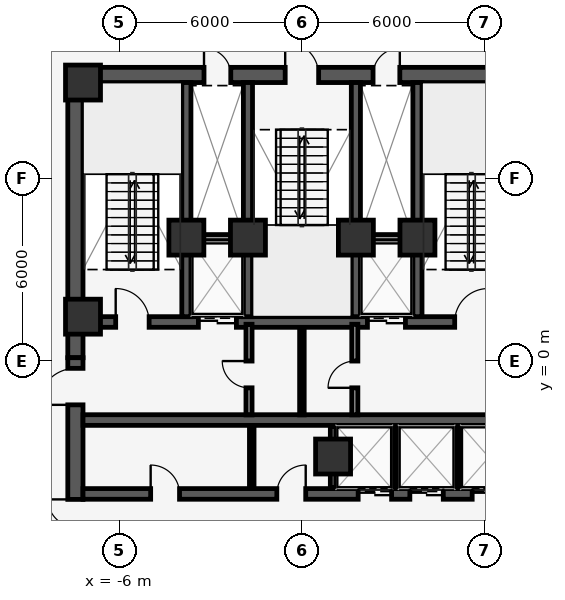
"""IFC4 building model, lengths in metres.
Left out: names, types, materials, properties, quantities, classifications, styles, units other than length and angle.
Written with IfcOpenShell. Run it as: python <this file> out.ifc"""

import sys

from ifc_helpers import new_model, si_unit, direction, frame, frame_2d, origin, origin_2d, place, context, subcontext, project, spatial, rectangle, extrude, element, fill, save


model = new_model("IFC4")
c1 = context("Model", 3, precision=1e-05, world=origin(), true_north=direction((0.0, 1.0)))
c2 = subcontext(c1, "Body", "Model", "MODEL_VIEW")
j1 = project(units=[si_unit("LENGTHUNIT", "METRE"), si_unit("PLANEANGLEUNIT", "RADIAN")], contexts=[c1])
p1 = place(None, origin())
s1 = spatial("IfcSite", under=j1, at=p1, CompositionType="ELEMENT")
p2 = place(p1, origin())
s2 = spatial("IfcBuilding", under=s1, at=p2, CompositionType="ELEMENT")
p3 = place(p2, frame((0.0, 0.0, 236.3)))
s3 = spatial("IfcBuildingStorey", under=s2, at=p3, CompositionType="ELEMENT", Elevation=236.3)
p4 = place(p3, frame((-7.45, 9.4, 0.0), z_axis=(0.0, 0.0, 1.0), x_axis=(1.0, 0.0, 0.0)))
e1 = element("IfcWall", 1, at=p4, inside=s3, PredefinedType="SHEAR", context=c2, shape_type="SweptSolid", body=[
    extrude(rectangle(XDim=14.9, YDim=0.5, at=frame_2d((7.45, 0.0))), origin(), (0.0, 0.0, 1.0), 3.85),
])
p5 = place(p4, frame((6.9, 0.0, 0.0)))
e2 = element("IfcOpeningElement", 2, at=p5, cuts=e1, PredefinedType="OPENING", context=c2, shape_type="SweptSolid", body=[
    extrude(rectangle(XDim=1.1, YDim=2.15, at=frame_2d((0.55, 1.075))), frame((0.0, 0.26, 0.0), z_axis=(0.0, -1.0, 0.0), x_axis=(1.0, 0.0, 0.0)), (0.0, 0.0, 1.0), 0.52),
])
p6 = place(p4, frame((4.23, 0.0, 0.0)))
e3 = element("IfcOpeningElement", 3, at=p6, cuts=e1, PredefinedType="OPENING", context=c2, shape_type="SweptSolid", body=[
    extrude(rectangle(XDim=0.88, YDim=2.15, at=frame_2d((0.44, 1.075))), frame((0.0, 0.26, 0.0), z_axis=(0.0, -1.0, 0.0), x_axis=(1.0, 0.0, 0.0)), (0.0, 0.0, 1.0), 0.52),
])
p7 = place(p4, frame((9.79, 0.0, 0.0)))
e4 = element("IfcOpeningElement", 4, at=p7, cuts=e1, PredefinedType="OPENING", context=c2, shape_type="SweptSolid", body=[
    extrude(rectangle(XDim=0.88, YDim=2.15, at=frame_2d((0.44, 1.075))), frame((0.0, 0.26, 0.0), z_axis=(0.0, -1.0, 0.0), x_axis=(1.0, 0.0, 0.0)), (0.0, 0.0, 1.0), 0.52),
])
p8 = place(p3, frame((-7.2, 1.275, 0.0), z_axis=(0.0, 0.0, 1.0), x_axis=(1.0, 0.0, 0.0)))
e5 = element("IfcWall", 5, at=p8, inside=s3, PredefinedType="SHEAR", context=c2, shape_type="SweptSolid", body=[
    extrude(rectangle(XDim=14.4, YDim=0.35, at=frame_2d((7.2, 0.0))), origin(), (0.0, 0.0, 1.0), 3.85),
])
p9 = place(p8, frame((3.795, 0.0, 0.0)))
e6 = element("IfcOpeningElement", 6, at=p9, cuts=e5, PredefinedType="OPENING", context=c2, shape_type="SweptSolid", body=[
    extrude(rectangle(XDim=1.25, YDim=2.25, at=frame_2d((0.625, 1.125))), frame((0.0, 0.185, 0.0), z_axis=(0.0, -1.0, 0.0), x_axis=(1.0, 0.0, 0.0)), (0.0, 0.0, 1.0), 0.37),
])
p10 = place(p8, frame((9.355, 0.0, 0.0)))
e7 = element("IfcOpeningElement", 7, at=p10, cuts=e5, PredefinedType="OPENING", context=c2, shape_type="SweptSolid", body=[
    extrude(rectangle(XDim=1.25, YDim=2.25, at=frame_2d((0.625, 1.125))), frame((0.0, 0.185, 0.0), z_axis=(0.0, -1.0, 0.0), x_axis=(1.0, 0.0, 0.0)), (0.0, 0.0, 1.0), 0.37),
])
p11 = place(p8, frame((1.075, 0.0, 0.0)))
e8 = element("IfcOpeningElement", 8, at=p11, cuts=e5, PredefinedType="OPENING", context=c2, shape_type="SweptSolid", body=[
    extrude(rectangle(XDim=1.1, YDim=2.15, at=frame_2d((0.55, 1.075))), frame((0.0, 0.185, 0.0), z_axis=(0.0, -1.0, 0.0), x_axis=(1.0, 0.0, 0.0)), (0.0, 0.0, 1.0), 0.37),
])
p12 = place(p8, frame((12.225, 0.0, 0.0)))
e9 = element("IfcOpeningElement", 9, at=p12, cuts=e5, PredefinedType="OPENING", context=c2, shape_type="SweptSolid", body=[
    extrude(rectangle(XDim=1.1, YDim=2.15, at=frame_2d((0.55, 1.075))), frame((0.0, 0.185, 0.0), z_axis=(0.0, -1.0, 0.0), x_axis=(1.0, 0.0, 0.0)), (0.0, 0.0, 1.0), 0.37),
])
for number, where, z_axis, x_axis in (
    (10, (-3.8, 1.45, 0.0), (0.0, 0.0, 1.0), (0.0, 1.0, 0.0)),
    (11, (-1.775, 1.45, 0.0), (0.0, 0.0, 1.0), (0.0, 1.0, 0.0)),
    (12, (1.775, 1.45, 0.0), (0.0, 0.0, 1.0), (0.0, 1.0, 0.0)),
    (13, (3.8, 1.45, 0.0), (0.0, 0.0, 1.0), (0.0, 1.0, 0.0)),
):
    element("IfcWall", number, at=place(p3, frame(where, z_axis=z_axis, x_axis=x_axis)), inside=s3, PredefinedType="SHEAR", context=c2, shape_type="SweptSolid", body=[
        extrude(rectangle(XDim=7.7, YDim=0.3, at=frame_2d((3.85, 0.0))), origin(), (0.0, 0.0, 1.0), 3.85),
    ])
p13 = place(p3, frame((-7.45, 0.1, 0.0), z_axis=(0.0, 0.0, 1.0), x_axis=(0.0, 1.0, 0.0)))
e14 = element("IfcWall", 14, at=p13, inside=s3, PredefinedType="SHEAR", context=c2, shape_type="SweptSolid", body=[
    extrude(rectangle(XDim=9.05, YDim=0.5, at=frame_2d((4.525, 0.0))), origin(), (0.0, 0.0, 1.0), 3.85),
])
p14 = place(p3, frame((-7.45, -9.0, 0.0), z_axis=(0.0, 0.0, 1.0), x_axis=(0.0, 1.0, 0.0)))
e15 = element("IfcWall", 15, at=p14, inside=s3, PredefinedType="SHEAR", context=c2, shape_type="SweptSolid", body=[
    extrude(rectangle(XDim=9.1, YDim=0.5, at=frame_2d((4.55, 0.0))), origin(), (0.0, 0.0, 1.0), 3.85),
])
p15 = place(p14, frame((2.64, 0.0, 0.0)))
e16 = element("IfcOpeningElement", 16, at=p15, cuts=e15, PredefinedType="OPENING", context=c2, shape_type="SweptSolid", body=[
    extrude(rectangle(XDim=1.8, YDim=2.2, at=frame_2d((0.9, 1.1))), frame((0.0, 0.26, 0.0), z_axis=(0.0, -1.0, 0.0), x_axis=(1.0, 0.0, 0.0)), (0.0, 0.0, 1.0), 0.52),
])
p16 = place(p14, frame((7.55, 0.0, 0.0)))
e17 = element("IfcOpeningElement", 17, at=p16, cuts=e15, PredefinedType="OPENING", context=c2, shape_type="SweptSolid", body=[
    extrude(rectangle(XDim=1.2, YDim=2.15, at=frame_2d((0.6, 1.075))), frame((0.0, 0.26, 0.0), z_axis=(0.0, -1.0, 0.0), x_axis=(1.0, 0.0, 0.0)), (0.0, 0.0, 1.0), 0.52),
])
p17 = place(p3, frame((-7.2, -1.95, 0.0), z_axis=(0.0, 0.0, 1.0), x_axis=(1.0, 0.0, 0.0)))
e18 = element("IfcWall", 18, at=p17, inside=s3, PredefinedType="SHEAR", context=c2, shape_type="SweptSolid", body=[
    extrude(rectangle(XDim=14.4, YDim=0.35, at=frame_2d((7.2, 0.0))), origin(), (0.0, 0.0, 1.0), 3.85),
])
p18 = place(p3, frame((-7.2, -4.38, 0.0), z_axis=(0.0, 0.0, 1.0), x_axis=(1.0, 0.0, 0.0)))
e19 = element("IfcWall", 19, at=p18, inside=s3, PredefinedType="SHEAR", context=c2, shape_type="SweptSolid", body=[
    extrude(rectangle(XDim=14.4, YDim=0.35, at=frame_2d((7.2, 0.0))), origin(), (0.0, 0.0, 1.0), 3.85),
])
p19 = place(p18, frame((9.05, 0.0, 0.0)))
e20 = element("IfcOpeningElement", 20, at=p19, cuts=e19, PredefinedType="OPENING", context=c2, shape_type="SweptSolid", body=[
    extrude(rectangle(XDim=1.1, YDim=2.2, at=frame_2d((0.55, 1.1))), frame((0.0, 0.185, 0.0), z_axis=(0.0, -1.0, 0.0), x_axis=(1.0, 0.0, 0.0)), (0.0, 0.0, 1.0), 0.37),
])
p20 = place(p18, frame((10.75, 0.0, 0.0)))
e21 = element("IfcOpeningElement", 21, at=p20, cuts=e19, PredefinedType="OPENING", context=c2, shape_type="SweptSolid", body=[
    extrude(rectangle(XDim=1.1, YDim=2.2, at=frame_2d((0.55, 1.1))), frame((0.0, 0.185, 0.0), z_axis=(0.0, -1.0, 0.0), x_axis=(1.0, 0.0, 0.0)), (0.0, 0.0, 1.0), 0.37),
])
p21 = place(p18, frame((12.8, 0.0, 0.0)))
e22 = element("IfcOpeningElement", 22, at=p21, cuts=e19, PredefinedType="OPENING", context=c2, shape_type="SweptSolid", body=[
    extrude(rectangle(XDim=1.1, YDim=2.2, at=frame_2d((0.55, 1.1))), frame((0.0, 0.185, 0.0), z_axis=(0.0, -1.0, 0.0), x_axis=(1.0, 0.0, 0.0)), (0.0, 0.0, 1.0), 0.37),
])
p22 = place(p18, frame((2.225, 0.0, 0.0)))
e23 = element("IfcOpeningElement", 23, at=p22, cuts=e19, PredefinedType="OPENING", context=c2, shape_type="SweptSolid", body=[
    extrude(rectangle(XDim=0.95, YDim=2.15, at=frame_2d((0.475, 1.075))), frame((0.0, 0.185, 0.0), z_axis=(0.0, -1.0, 0.0), x_axis=(1.0, 0.0, 0.0)), (0.0, 0.0, 1.0), 0.37),
])
p23 = place(p18, frame((6.375, 0.0, 0.0)))
e24 = element("IfcOpeningElement", 24, at=p23, cuts=e19, PredefinedType="OPENING", context=c2, shape_type="SweptSolid", body=[
    extrude(rectangle(XDim=0.95, YDim=2.15, at=frame_2d((0.475, 1.075))), frame((0.0, 0.185, 0.0), z_axis=(0.0, -1.0, 0.0), x_axis=(1.0, 0.0, 0.0)), (0.0, 0.0, 1.0), 0.37),
])
for number, where, z_axis, x_axis in (
    (25, (-7.2, 9.15, 0.0), (0.0, 0.0, 1.0), (1.0, 0.0, 0.0)),
    (26, (-7.2, 1.45, 0.0), (0.0, 0.0, 1.0), (1.0, 0.0, 0.0)),
    (27, (-3.8, 4.05, 0.0), (0.0, 0.0, 1.0), (1.0, 0.0, 0.0)),
    (28, (3.8, 4.05, 0.0), (0.0, 0.0, 1.0), (1.0, 0.0, 0.0)),
    (29, (-1.775, 4.05, 0.0), (0.0, 0.0, 1.0), (1.0, 0.0, 0.0)),
    (30, (1.775, 4.05, 0.0), (0.0, 0.0, 1.0), (1.0, 0.0, 0.0)),
    (31, (1.025, -3.15, 0.0), (0.0, 0.0, 1.0), (1.0, 0.0, 0.0)),
):
    element("IfcColumn", number, at=place(p3, frame(where, z_axis=z_axis, x_axis=x_axis)), inside=s3, PredefinedType="COLUMN", context=c2, shape_type="SweptSolid", body=[
        extrude(rectangle(XDim=1.15, YDim=1.15, at=origin_2d()), origin(), (0.0, 0.0, 1.0), 4.1),
    ])
p24 = place(p3, frame((-17.407, 24.748, 0.0), z_axis=(0.0, 0.0, 1.0), x_axis=(0.953082756031, -0.302709861346, 0.0)))
e32 = element("IfcWall", 32, at=p24, inside=s3, PredefinedType="STANDARD", context=c2, shape_type="SweptSolid", body=[
    extrude(rectangle(XDim=49.145, YDim=0.28, at=frame_2d((24.573, 0.0))), origin(), (0.0, 0.0, 1.0), 3.85),
])
p25 = place(p24, frame((24.073, 0.0, 0.0)))
e33 = element("IfcOpeningElement", 33, at=p25, cuts=e32, PredefinedType="OPENING", context=c2, shape_type="SweptSolid", body=[
    extrude(rectangle(XDim=1.0, YDim=2.15, at=frame_2d((0.5, 1.075))), frame((0.0, 0.15, 0.0), z_axis=(0.0, -1.0, 0.0), x_axis=(1.0, 0.0, 0.0)), (0.0, 0.0, 1.0), 0.3),
])
p26 = place(p24, frame((4.373, 0.0, 0.85)))
e34 = element("IfcOpeningElement", 34, at=p26, cuts=e32, PredefinedType="OPENING", context=c2, shape_type="SweptSolid", body=[
    extrude(rectangle(XDim=1.2, YDim=2.2, at=frame_2d((0.6, 1.1))), frame((0.0, 0.15, 0.0), z_axis=(0.0, -1.0, 0.0), x_axis=(1.0, 0.0, 0.0)), (0.0, 0.0, 1.0), 0.3),
])
p27 = place(p24, frame((9.973, 0.0, 0.85)))
e35 = element("IfcOpeningElement", 35, at=p27, cuts=e32, PredefinedType="OPENING", context=c2, shape_type="SweptSolid", body=[
    extrude(rectangle(XDim=1.2, YDim=2.2, at=frame_2d((0.6, 1.1))), frame((0.0, 0.15, 0.0), z_axis=(0.0, -1.0, 0.0), x_axis=(1.0, 0.0, 0.0)), (0.0, 0.0, 1.0), 0.3),
])
p28 = place(p24, frame((21.173, 0.0, 0.85)))
e36 = element("IfcOpeningElement", 36, at=p28, cuts=e32, PredefinedType="OPENING", context=c2, shape_type="SweptSolid", body=[
    extrude(rectangle(XDim=1.2, YDim=2.2, at=frame_2d((0.6, 1.1))), frame((0.0, 0.15, 0.0), z_axis=(0.0, -1.0, 0.0), x_axis=(1.0, 0.0, 0.0)), (0.0, 0.0, 1.0), 0.3),
])
p29 = place(p24, frame((37.973, 0.0, 0.85)))
e37 = element("IfcOpeningElement", 37, at=p29, cuts=e32, PredefinedType="OPENING", context=c2, shape_type="SweptSolid", body=[
    extrude(rectangle(XDim=1.2, YDim=2.2, at=frame_2d((0.6, 1.1))), frame((0.0, 0.15, 0.0), z_axis=(0.0, -1.0, 0.0), x_axis=(1.0, 0.0, 0.0)), (0.0, 0.0, 1.0), 0.3),
])
p30 = place(p24, frame((43.573, 0.0, 0.85)))
e38 = element("IfcOpeningElement", 38, at=p30, cuts=e32, PredefinedType="OPENING", context=c2, shape_type="SweptSolid", body=[
    extrude(rectangle(XDim=1.2, YDim=2.2, at=frame_2d((0.6, 1.1))), frame((0.0, 0.15, 0.0), z_axis=(0.0, -1.0, 0.0), x_axis=(1.0, 0.0, 0.0)), (0.0, 0.0, 1.0), 0.3),
])
p31 = place(p3, frame((30.935, 2.916, 0.0), z_axis=(0.0, 0.0, 1.0), x_axis=(-0.743143233829, -0.66913237406, 0.0)))
e39 = element("IfcWall", 39, at=p31, inside=s3, PredefinedType="STANDARD", context=c2, shape_type="SweptSolid", body=[
    extrude(rectangle(XDim=49.88, YDim=0.28, at=frame_2d((24.94, 0.0))), origin(), (0.0, 0.0, 1.0), 3.85),
])
p32 = place(p31, frame((24.44, 0.0, 0.0)))
e40 = element("IfcOpeningElement", 40, at=p32, cuts=e39, PredefinedType="OPENING", context=c2, shape_type="SweptSolid", body=[
    extrude(rectangle(XDim=1.0, YDim=2.15, at=frame_2d((0.5, 1.075))), frame((0.0, 0.15, 0.0), z_axis=(0.0, -1.0, 0.0), x_axis=(1.0, 0.0, 0.0)), (0.0, 0.0, 1.0), 0.3),
])
p33 = place(p31, frame((4.74, 0.0, 0.85)))
e41 = element("IfcOpeningElement", 41, at=p33, cuts=e39, PredefinedType="OPENING", context=c2, shape_type="SweptSolid", body=[
    extrude(rectangle(XDim=1.2, YDim=2.2, at=frame_2d((0.6, 1.1))), frame((0.0, 0.15, 0.0), z_axis=(0.0, -1.0, 0.0), x_axis=(1.0, 0.0, 0.0)), (0.0, 0.0, 1.0), 0.3),
])
p34 = place(p31, frame((10.34, 0.0, 0.85)))
e42 = element("IfcOpeningElement", 42, at=p34, cuts=e39, PredefinedType="OPENING", context=c2, shape_type="SweptSolid", body=[
    extrude(rectangle(XDim=1.2, YDim=2.2, at=frame_2d((0.6, 1.1))), frame((0.0, 0.15, 0.0), z_axis=(0.0, -1.0, 0.0), x_axis=(1.0, 0.0, 0.0)), (0.0, 0.0, 1.0), 0.3),
])
p35 = place(p31, frame((27.14, 0.0, 0.85)))
e43 = element("IfcOpeningElement", 43, at=p35, cuts=e39, PredefinedType="OPENING", context=c2, shape_type="SweptSolid", body=[
    extrude(rectangle(XDim=1.2, YDim=2.2, at=frame_2d((0.6, 1.1))), frame((0.0, 0.15, 0.0), z_axis=(0.0, -1.0, 0.0), x_axis=(1.0, 0.0, 0.0)), (0.0, 0.0, 1.0), 0.3),
])
p36 = place(p31, frame((38.34, 0.0, 0.85)))
e44 = element("IfcOpeningElement", 44, at=p36, cuts=e39, PredefinedType="OPENING", context=c2, shape_type="SweptSolid", body=[
    extrude(rectangle(XDim=1.2, YDim=2.2, at=frame_2d((0.6, 1.1))), frame((0.0, 0.15, 0.0), z_axis=(0.0, -1.0, 0.0), x_axis=(1.0, 0.0, 0.0)), (0.0, 0.0, 1.0), 0.3),
])
p37 = place(p31, frame((43.94, 0.0, 0.85)))
e45 = element("IfcOpeningElement", 45, at=p37, cuts=e39, PredefinedType="OPENING", context=c2, shape_type="SweptSolid", body=[
    extrude(rectangle(XDim=1.2, YDim=2.2, at=frame_2d((0.6, 1.1))), frame((0.0, 0.15, 0.0), z_axis=(0.0, -1.0, 0.0), x_axis=(1.0, 0.0, 0.0)), (0.0, 0.0, 1.0), 0.3),
])
for number, where, z_axis, x_axis in (
    (46, (-3.65, 4.05, 0.0), (0.0, 0.0, 1.0), (1.0, 0.0, 0.0)),
    (47, (1.92, 4.05, 0.0), (0.0, 0.0, 1.0), (1.0, 0.0, 0.0)),
):
    element("IfcWall", number, at=place(p3, frame(where, z_axis=z_axis, x_axis=x_axis)), inside=s3, PredefinedType="PARTITIONING", context=c2, shape_type="SweptSolid", body=[
        extrude(rectangle(XDim=1.73, YDim=0.2, at=frame_2d((0.865, 0.0))), origin(), (0.0, 0.0, 1.0), 3.85),
    ])
p38 = place(p3, frame((1.025, -4.18, 0.0), z_axis=(0.0, 0.0, 1.0), x_axis=(0.0, 1.0, 0.0)))
e48 = element("IfcWall", 48, at=p38, inside=s3, PredefinedType="PARTITIONING", context=c2, shape_type="SweptSolid", body=[
    extrude(rectangle(XDim=2.03, YDim=0.18, at=frame_2d((1.015, 0.0))), origin(), (0.0, 0.0, 1.0), 2.898),
])
for number, where, z_axis, x_axis in (
    (49, (-1.65, -4.18, 0.0), (0.0, 0.0, 1.0), (0.0, 1.0, 0.0)),
    (50, (3.075, -4.18, 0.0), (0.0, 0.0, 1.0), (0.0, 1.0, 0.0)),
    (51, (5.125, -4.18, 0.0), (0.0, 0.0, 1.0), (0.0, 1.0, 0.0)),
):
    element("IfcWall", number, at=place(p3, frame(where, z_axis=z_axis, x_axis=x_axis)), inside=s3, PredefinedType="PARTITIONING", context=c2, shape_type="SweptSolid", body=[
        extrude(rectangle(XDim=2.03, YDim=0.15, at=frame_2d((1.015, 0.0))), origin(), (0.0, 0.0, 1.0), 3.85),
    ])
p39 = place(p3, frame((-1.74, -1.78, 0.0), z_axis=(0.0, 0.0, 1.0), x_axis=(0.0, 1.0, 0.0)))
e52 = element("IfcWall", 52, at=p39, inside=s3, PredefinedType="PARTITIONING", context=c2, shape_type="SweptSolid", body=[
    extrude(rectangle(XDim=2.98, YDim=0.2, at=frame_2d((1.49, 0.0))), origin(), (0.0, 0.0, 1.0), 3.85),
])
p40 = place(p39, frame((0.89, 0.0, 0.0)))
e53 = element("IfcOpeningElement", 53, at=p40, cuts=e52, PredefinedType="OPENING", context=c2, shape_type="SweptSolid", body=[
    extrude(rectangle(XDim=0.88, YDim=2.15, at=frame_2d((0.44, 1.075))), frame((0.0, 0.11, 0.0), z_axis=(0.0, -1.0, 0.0), x_axis=(1.0, 0.0, 0.0)), (0.0, 0.0, 1.0), 0.22),
])
p41 = place(p3, frame((1.74, -1.78, 0.0), z_axis=(0.0, 0.0, 1.0), x_axis=(0.0, 1.0, 0.0)))
e54 = element("IfcWall", 54, at=p41, inside=s3, PredefinedType="PARTITIONING", context=c2, shape_type="SweptSolid", body=[
    extrude(rectangle(XDim=2.98, YDim=0.2, at=frame_2d((1.49, 0.0))), origin(), (0.0, 0.0, 1.0), 3.85),
])
p42 = place(p41, frame((0.89, 0.0, 0.0)))
e55 = element("IfcOpeningElement", 55, at=p42, cuts=e54, PredefinedType="OPENING", context=c2, shape_type="SweptSolid", body=[
    extrude(rectangle(XDim=0.88, YDim=2.15, at=frame_2d((0.44, 1.075))), frame((0.0, 0.11, 0.0), z_axis=(0.0, -1.0, 0.0), x_axis=(1.0, 0.0, 0.0)), (0.0, 0.0, 1.0), 0.22),
])
p43 = place(p3, frame((0.0, -1.78, 0.0), z_axis=(0.0, 0.0, 1.0), x_axis=(0.0, 1.0, 0.0)))
e56 = element("IfcWall", 56, at=p43, inside=s3, PredefinedType="PARTITIONING", context=c2, shape_type="SweptSolid", body=[
    extrude(rectangle(XDim=2.83, YDim=0.15, at=frame_2d((1.415, 0.0))), origin(), (0.0, 0.0, 1.0), 3.85),
])
p44 = place(p19, origin())
e57 = element("IfcDoor", 57, at=p44, inside=s3, OperationType="DOUBLE_DOOR_SLIDING", PredefinedType="DOOR", context=c2, shape_type="SweptSolid", body=[
    extrude(rectangle(XDim=1.1, YDim=2.2, at=frame_2d((0.55, 1.1))), frame((0.0, 0.025, 0.0), z_axis=(0.0, -1.0, 0.0), x_axis=(1.0, 0.0, 0.0)), (0.0, 0.0, 1.0), 0.05),
])
fill(e20, e57)
p45 = place(p20, origin())
e58 = element("IfcDoor", 58, at=p45, inside=s3, OperationType="DOUBLE_DOOR_SLIDING", PredefinedType="DOOR", context=c2, shape_type="SweptSolid", body=[
    extrude(rectangle(XDim=1.1, YDim=2.2, at=frame_2d((0.55, 1.1))), frame((0.0, 0.025, 0.0), z_axis=(0.0, -1.0, 0.0), x_axis=(1.0, 0.0, 0.0)), (0.0, 0.0, 1.0), 0.05),
])
fill(e21, e58)
p46 = place(p21, origin())
e59 = element("IfcDoor", 59, at=p46, inside=s3, OperationType="DOUBLE_DOOR_SLIDING", PredefinedType="DOOR", context=c2, shape_type="SweptSolid", body=[
    extrude(rectangle(XDim=1.1, YDim=2.2, at=frame_2d((0.55, 1.1))), frame((0.0, 0.025, 0.0), z_axis=(0.0, -1.0, 0.0), x_axis=(1.0, 0.0, 0.0)), (0.0, 0.0, 1.0), 0.05),
])
fill(e22, e59)
p47 = place(p9, origin())
e60 = element("IfcDoor", 60, at=p47, inside=s3, OperationType="DOUBLE_DOOR_SLIDING", PredefinedType="DOOR", context=c2, shape_type="SweptSolid", body=[
    extrude(rectangle(XDim=1.25, YDim=2.25, at=frame_2d((0.625, 1.125))), frame((0.0, 0.025, 0.0), z_axis=(0.0, -1.0, 0.0), x_axis=(1.0, 0.0, 0.0)), (0.0, 0.0, 1.0), 0.05),
])
fill(e6, e60)
p48 = place(p10, origin())
e61 = element("IfcDoor", 61, at=p48, inside=s3, OperationType="DOUBLE_DOOR_SLIDING", PredefinedType="DOOR", context=c2, shape_type="SweptSolid", body=[
    extrude(rectangle(XDim=1.25, YDim=2.25, at=frame_2d((0.625, 1.125))), frame((0.0, 0.025, 0.0), z_axis=(0.0, -1.0, 0.0), x_axis=(1.0, 0.0, 0.0)), (0.0, 0.0, 1.0), 0.05),
])
fill(e7, e61)
p49 = place(p11, origin())
e62 = element("IfcDoor", 62, at=p49, inside=s3, OperationType="SINGLE_SWING_LEFT", PredefinedType="DOOR", context=c2, shape_type="SweptSolid", body=[
    extrude(rectangle(XDim=1.1, YDim=2.15, at=frame_2d((0.55, 1.075))), frame((0.0, 0.025, 0.0), z_axis=(0.0, -1.0, 0.0), x_axis=(1.0, 0.0, 0.0)), (0.0, 0.0, 1.0), 0.05),
])
fill(e8, e62)
p50 = place(p12, origin())
e63 = element("IfcDoor", 63, at=p50, inside=s3, OperationType="SINGLE_SWING_RIGHT", PredefinedType="DOOR", context=c2, shape_type="SweptSolid", body=[
    extrude(rectangle(XDim=1.1, YDim=2.15, at=frame_2d((0.55, 1.075))), frame((0.0, 0.025, 0.0), z_axis=(0.0, -1.0, 0.0), x_axis=(1.0, 0.0, 0.0)), (0.0, 0.0, 1.0), 0.05),
])
fill(e9, e63)
p51 = place(p5, origin())
e64 = element("IfcDoor", 64, at=p51, inside=s3, OperationType="SINGLE_SWING_LEFT", PredefinedType="DOOR", context=c2, shape_type="SweptSolid", body=[
    extrude(rectangle(XDim=1.1, YDim=2.15, at=frame_2d((0.55, 1.075))), frame((0.0, 0.025, 0.0), z_axis=(0.0, -1.0, 0.0), x_axis=(1.0, 0.0, 0.0)), (0.0, 0.0, 1.0), 0.05),
])
fill(e2, e64)
p52 = place(p6, origin())
e65 = element("IfcDoor", 65, at=p52, inside=s3, OperationType="SINGLE_SWING_LEFT", PredefinedType="DOOR", context=c2, shape_type="SweptSolid", body=[
    extrude(rectangle(XDim=0.88, YDim=2.15, at=frame_2d((0.44, 1.075))), frame((0.0, 0.025, 0.0), z_axis=(0.0, -1.0, 0.0), x_axis=(1.0, 0.0, 0.0)), (0.0, 0.0, 1.0), 0.05),
])
fill(e3, e65)
p53 = place(p7, origin())
e66 = element("IfcDoor", 66, at=p53, inside=s3, OperationType="SINGLE_SWING_RIGHT", PredefinedType="DOOR", context=c2, shape_type="SweptSolid", body=[
    extrude(rectangle(XDim=0.88, YDim=2.15, at=frame_2d((0.44, 1.075))), frame((0.0, 0.025, 0.0), z_axis=(0.0, -1.0, 0.0), x_axis=(1.0, 0.0, 0.0)), (0.0, 0.0, 1.0), 0.05),
])
fill(e4, e66)
p54 = place(p15, origin())
e67 = element("IfcDoor", 67, at=p54, inside=s3, OperationType="DOUBLE_DOOR_SINGLE_SWING", PredefinedType="DOOR", context=c2, shape_type="SweptSolid", body=[
    extrude(rectangle(XDim=1.8, YDim=2.2, at=frame_2d((0.9, 1.1))), frame((0.0, 0.025, 0.0), z_axis=(0.0, -1.0, 0.0), x_axis=(1.0, 0.0, 0.0)), (0.0, 0.0, 1.0), 0.05),
])
fill(e16, e67)
p55 = place(p16, origin())
e68 = element("IfcDoor", 68, at=p55, inside=s3, OperationType="SINGLE_SWING_LEFT", PredefinedType="DOOR", context=c2, shape_type="SweptSolid", body=[
    extrude(rectangle(XDim=1.2, YDim=2.15, at=frame_2d((0.6, 1.075))), frame((0.0, 0.025, 0.0), z_axis=(0.0, -1.0, 0.0), x_axis=(1.0, 0.0, 0.0)), (0.0, 0.0, 1.0), 0.05),
])
fill(e17, e68)
p56 = place(p22, origin())
e69 = element("IfcDoor", 69, at=p56, inside=s3, OperationType="SINGLE_SWING_LEFT", PredefinedType="DOOR", context=c2, shape_type="SweptSolid", body=[
    extrude(rectangle(XDim=0.95, YDim=2.15, at=frame_2d((0.475, 1.075))), frame((0.0, 0.025, 0.0), z_axis=(0.0, -1.0, 0.0), x_axis=(1.0, 0.0, 0.0)), (0.0, 0.0, 1.0), 0.05),
])
fill(e23, e69)
p57 = place(p23, origin())
e70 = element("IfcDoor", 70, at=p57, inside=s3, OperationType="SINGLE_SWING_RIGHT", PredefinedType="DOOR", context=c2, shape_type="SweptSolid", body=[
    extrude(rectangle(XDim=0.95, YDim=2.15, at=frame_2d((0.475, 1.075))), frame((0.0, 0.025, 0.0), z_axis=(0.0, -1.0, 0.0), x_axis=(1.0, 0.0, 0.0)), (0.0, 0.0, 1.0), 0.05),
])
fill(e24, e70)
p58 = place(p40, origin())
e71 = element("IfcDoor", 71, at=p58, inside=s3, OperationType="SINGLE_SWING_RIGHT", PredefinedType="DOOR", context=c2, shape_type="SweptSolid", body=[
    extrude(rectangle(XDim=0.88, YDim=2.15, at=frame_2d((0.44, 1.075))), frame((0.0, 0.025, 0.0), z_axis=(0.0, -1.0, 0.0), x_axis=(1.0, 0.0, 0.0)), (0.0, 0.0, 1.0), 0.05),
])
fill(e53, e71)
p59 = place(p42, origin())
e72 = element("IfcDoor", 72, at=p59, inside=s3, OperationType="SINGLE_SWING_LEFT", PredefinedType="DOOR", context=c2, shape_type="SweptSolid", body=[
    extrude(rectangle(XDim=0.88, YDim=2.15, at=frame_2d((0.44, 1.075))), frame((0.0, 0.025, 0.0), z_axis=(0.0, -1.0, 0.0), x_axis=(1.0, 0.0, 0.0)), (0.0, 0.0, 1.0), 0.05),
])
fill(e55, e72)
save(model, sys.argv[1])
